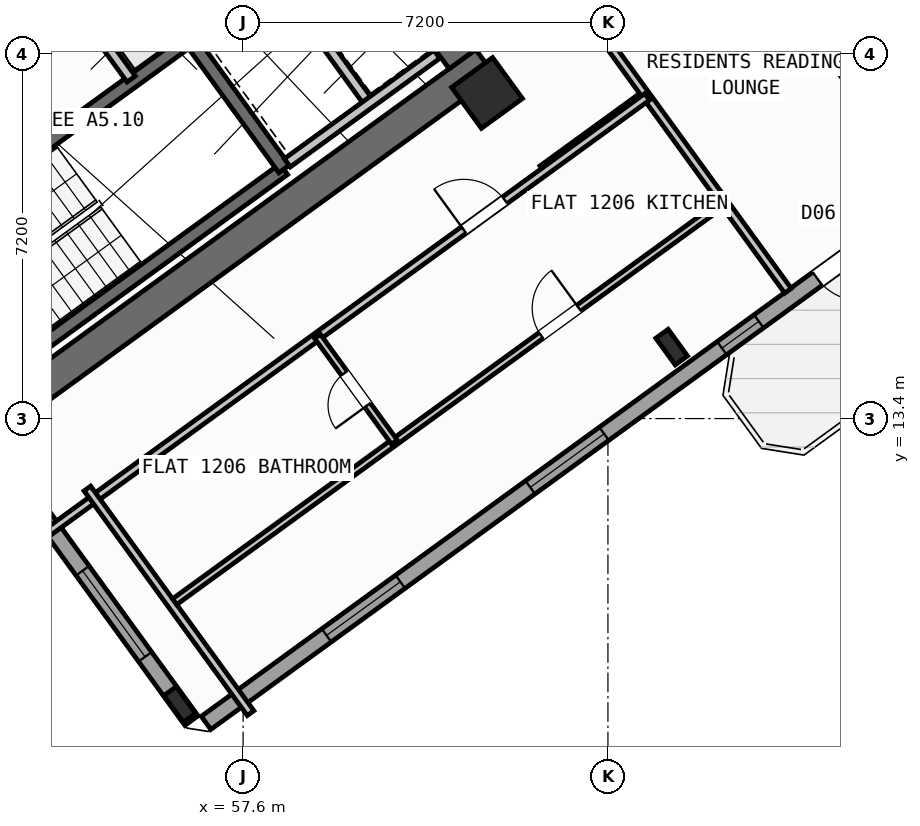
"""IFC4 building model, lengths in metres.
Left out: names, types, materials, properties, quantities, classifications, styles, units other than length and angle.
Written with IfcOpenShell. Run it as: python <this file> out.ifc"""

import sys

from ifc_helpers import new_model, si_unit, direction, frame, frame_2d, origin, origin_2d, place, context, subcontext, project, spatial, rectangle, hollow_rectangle, i_section, extrude, source, transform, mapped, element, fill, save


model = new_model("IFC4")
c1 = context("Model", 3, precision=1e-05, world=origin(), true_north=direction((0.0, 1.0)))
c2 = subcontext(c1, "Body", "Model", "MODEL_VIEW")
j1 = project(units=[si_unit("LENGTHUNIT", "METRE"), si_unit("PLANEANGLEUNIT", "RADIAN")], contexts=[c1])
p1 = place(None, origin())
s1 = spatial("IfcSite", under=j1, at=p1, CompositionType="ELEMENT")
p2 = place(p1, origin())
s2 = spatial("IfcBuilding", under=s1, at=p2, CompositionType="ELEMENT")
p3 = place(p2, frame((0.0, 0.0, 49.2)))
s3 = spatial("IfcBuildingStorey", under=s2, at=p3, CompositionType="ELEMENT", Elevation=49.2)
p4 = place(p3, frame((52.318, 13.11, 0.0), z_axis=(0.0, 0.0, 1.0), x_axis=(0.809019445368, 0.587781878776, 0.0)))
e1 = element("IfcWall", 1, at=p4, inside=s3, PredefinedType="SHEAR", context=c2, shape_type="SweptSolid", body=[
    extrude(rectangle(XDim=12.44, YDim=0.65, at=frame_2d((6.22, 0.0))), origin(), (0.0, 0.0, 1.0), 3.35),
])
p5 = place(p3, frame((61.929, 20.494, 0.0), z_axis=(0.0, 0.0, 1.0), x_axis=(-0.58782982593, 0.808984607855, 0.0)))
e2 = element("IfcWall", 2, at=p5, inside=s3, PredefinedType="SHEAR", context=c2, shape_type="SweptSolid", body=[
    extrude(rectangle(XDim=3.525, YDim=0.65, at=frame_2d((1.762, 0.0))), origin(), (0.0, 0.0, 1.0), 3.35),
])
m1 = source(origin(), c2, "Body", "SweptSolid", [
    extrude(i_section(OverallWidth=0.3, OverallDepth=0.65, WebThickness=0.016, FlangeThickness=0.031, at=origin_2d()), origin(), (0.0, 0.0, 1.0), 3.6),
])
for number, where, z_axis, x_axis in (
    (3, (56.35, 7.758, 0.0), (0.0, 0.0, 1.0), (0.809, 0.588, 0.0)),
    (4, (66.058, 14.811, 0.0), (0.0, 0.0, 1.0), (0.809, 0.588, 0.0)),
):
    element("IfcColumn", number, at=place(p3, frame(where, z_axis=z_axis, x_axis=x_axis)), inside=s3, PredefinedType="COLUMN", context=c2, shape_type="MappedRepresentation", body=[
        mapped(m1, transform((0.0, 0.0, 0.0), scale=1.0)),
    ])
m2 = source(origin(), c2, "Body", "SweptSolid", [
    extrude(hollow_rectangle(XDim=1.0, YDim=1.0, WallThickness=0.04, at=origin_2d()), origin(), (0.0, 0.0, 1.0), 3.6),
])
p6 = place(p3, frame((62.414, 19.827, 0.0), z_axis=(0.0, 0.0, 1.0), x_axis=(0.809016994375, 0.587785252292, 0.0)))
e5 = element("IfcColumn", 5, at=p6, inside=s3, PredefinedType="COLUMN", context=c2, shape_type="MappedRepresentation", body=[
    mapped(m2, transform((0.0, 0.0, 0.0), scale=1.0)),
])
p7 = place(p3, frame((58.455, 35.484, 0.0), z_axis=(0.0, 0.0, 1.0), x_axis=(0.587783625747, -0.809018176127, 0.0)))
e6 = element("IfcWall", 6, at=p7, inside=s3, PredefinedType="STANDARD", context=c2, shape_type="SweptSolid", body=[
    extrude(rectangle(XDim=21.587, YDim=0.32, at=frame_2d((10.794, 0.0))), origin(), (0.0, 0.0, 1.0), 2.725),
])
p8 = place(p7, frame((1.5, 0.0, 0.8)))
e7 = element("IfcOpeningElement", 7, at=p8, cuts=e6, PredefinedType="OPENING", context=c2, shape_type="SweptSolid", body=[
    extrude(rectangle(XDim=2.1, YDim=1.55, at=frame_2d((1.05, 0.775))), frame((0.0, 0.17, 0.0), z_axis=(0.0, -1.0, 0.0), x_axis=(1.0, 0.0, 0.0)), (0.0, 0.0, 1.0), 0.34),
])
p9 = place(p7, frame((5.105, 0.0, 0.85)))
e8 = element("IfcOpeningElement", 8, at=p9, cuts=e6, PredefinedType="OPENING", context=c2, shape_type="SweptSolid", body=[
    extrude(rectangle(XDim=1.5, YDim=1.5, at=frame_2d((0.75, 0.75))), frame((0.0, 0.17, 0.0), z_axis=(0.0, -1.0, 0.0), x_axis=(1.0, 0.0, 0.0)), (0.0, 0.0, 1.0), 0.34),
])
p10 = place(p7, frame((8.954, 0.0, 0.85)))
e9 = element("IfcOpeningElement", 9, at=p10, cuts=e6, PredefinedType="OPENING", context=c2, shape_type="SweptSolid", body=[
    extrude(rectangle(XDim=1.5, YDim=1.5, at=frame_2d((0.75, 0.75))), frame((0.0, 0.17, 0.0), z_axis=(0.0, -1.0, 0.0), x_axis=(1.0, 0.0, 0.0)), (0.0, 0.0, 1.0), 0.34),
])
p11 = place(p7, frame((17.581, 0.0, 0.95)))
e10 = element("IfcOpeningElement", 10, at=p11, cuts=e6, PredefinedType="OPENING", context=c2, shape_type="SweptSolid", body=[
    extrude(rectangle(XDim=1.2, YDim=1.4, at=frame_2d((0.6, 0.7))), frame((0.0, 0.17, 0.0), z_axis=(0.0, -1.0, 0.0), x_axis=(1.0, 0.0, 0.0)), (0.0, 0.0, 1.0), 0.34),
])
p12 = place(p3, frame((71.098, 17.731, 0.0), z_axis=(0.0, 0.0, 1.0), x_axis=(-0.809021120468, -0.587779573171, 0.0)))
e11 = element("IfcWall", 11, at=p12, inside=s3, PredefinedType="STANDARD", context=c2, shape_type="SweptSolid", body=[
    extrude(rectangle(XDim=17.588, YDim=0.32, at=frame_2d((8.794, 0.0))), origin(), (0.0, 0.0, 1.0), 3.35),
])
p13 = place(p12, frame((1.624, 0.0, 0.0)))
e12 = element("IfcOpeningElement", 12, at=p13, cuts=e11, PredefinedType="OPENING", context=c2, shape_type="SweptSolid", body=[
    extrude(rectangle(XDim=1.05, YDim=2.15, at=frame_2d((0.525, 1.075))), frame((0.0, 0.17, 0.0), z_axis=(0.0, -1.0, 0.0), x_axis=(1.0, 0.0, 0.0)), (0.0, 0.0, 1.0), 0.34),
])
p14 = place(p12, frame((4.104, 0.0, 1.0)))
e13 = element("IfcOpeningElement", 13, at=p14, cuts=e11, PredefinedType="OPENING", context=c2, shape_type="SweptSolid", body=[
    extrude(rectangle(XDim=0.9, YDim=1.25, at=frame_2d((0.45, 0.625))), frame((0.0, 0.17, 0.0), z_axis=(0.0, -1.0, 0.0), x_axis=(1.0, 0.0, 0.0)), (0.0, 0.0, 1.0), 0.34),
])
p15 = place(p12, frame((7.879, 0.0, 0.85)))
e14 = element("IfcOpeningElement", 14, at=p15, cuts=e11, PredefinedType="OPENING", context=c2, shape_type="SweptSolid", body=[
    extrude(rectangle(XDim=1.8, YDim=1.5, at=frame_2d((0.9, 0.75))), frame((0.0, 0.17, 0.0), z_axis=(0.0, -1.0, 0.0), x_axis=(1.0, 0.0, 0.0)), (0.0, 0.0, 1.0), 0.34),
])
p16 = place(p12, frame((12.849, 0.0, 0.85)))
e15 = element("IfcOpeningElement", 15, at=p16, cuts=e11, PredefinedType="OPENING", context=c2, shape_type="SweptSolid", body=[
    extrude(rectangle(XDim=1.8, YDim=1.5, at=frame_2d((0.9, 0.75))), frame((0.0, 0.17, 0.0), z_axis=(0.0, -1.0, 0.0), x_axis=(1.0, 0.0, 0.0)), (0.0, 0.0, 1.0), 0.34),
])
p17 = place(p3, frame((56.581, 7.439, 0.0), z_axis=(0.0, 0.0, 1.0), x_axis=(-0.587785875463, 0.809016541614, 0.0)))
e16 = element("IfcWall", 16, at=p17, inside=s3, PredefinedType="STANDARD", context=c2, shape_type="SweptSolid", body=[
    extrude(rectangle(XDim=6.774, YDim=0.32, at=frame_2d((3.387, 0.0))), origin(), (0.0, 0.0, 1.0), 2.725),
])
p18 = place(p17, frame((1.556, 0.0, 0.8)))
e17 = element("IfcOpeningElement", 17, at=p18, cuts=e16, PredefinedType="OPENING", context=c2, shape_type="SweptSolid", body=[
    extrude(rectangle(XDim=2.1, YDim=1.55, at=frame_2d((1.05, 0.775))), frame((0.0, 0.17, 0.0), z_axis=(0.0, -1.0, 0.0), x_axis=(1.0, 0.0, 0.0)), (0.0, 0.0, 1.0), 0.34),
])
p19 = place(p3, frame((52.472, 14.013, 0.0), z_axis=(0.0, 0.0, 1.0), x_axis=(0.809028366311, 0.587769599847, 0.0)))
e18 = element("IfcWall", 18, at=p19, inside=s3, PredefinedType="SHEAR", context=c2, shape_type="SweptSolid", body=[
    extrude(rectangle(XDim=7.33, YDim=0.26, at=frame_2d((3.665, 0.0))), origin(), (0.0, 0.0, 1.0), 3.35),
])
p20 = place(p3, frame((50.615, 16.57, 0.0), z_axis=(0.0, 0.0, 1.0), x_axis=(0.809028366311, 0.587769599847, 0.0)))
e19 = element("IfcWall", 19, at=p20, inside=s3, PredefinedType="SHEAR", context=c2, shape_type="SweptSolid", body=[
    extrude(rectangle(XDim=7.33, YDim=0.26, at=frame_2d((3.665, 0.0))), origin(), (0.0, 0.0, 1.0), 3.35),
])
p21 = place(p20, frame((0.22, 0.0, 0.0)))
e20 = element("IfcOpeningElement", 20, at=p21, cuts=e19, PredefinedType="OPENING", context=c2, shape_type="SweptSolid", body=[
    extrude(rectangle(XDim=1.1, YDim=2.1, at=frame_2d((0.55, 1.05))), frame((0.0, 0.14, 0.0), z_axis=(0.0, -1.0, 0.0), x_axis=(1.0, 0.0, 0.0)), (0.0, 0.0, 1.0), 0.28),
])
p22 = place(p3, frame((58.41, 18.327, 0.0), z_axis=(0.0, 0.0, 1.0), x_axis=(-0.58776738483, 0.809029975545, 0.0)))
e21 = element("IfcWall", 21, at=p22, inside=s3, PredefinedType="SHEAR", context=c2, shape_type="SweptSolid", body=[
    extrude(rectangle(XDim=3.16, YDim=0.26, at=frame_2d((1.58, 0.0))), origin(), (0.0, 0.0, 1.0), 3.35),
])
p23 = place(p3, frame((55.391, 20.102, 0.0), z_axis=(0.0, 0.0, 1.0), x_axis=(-0.58778447739, 0.809017557374, 0.0)))
e22 = element("IfcWall", 22, at=p23, inside=s3, PredefinedType="STANDARD", context=c2, shape_type="SweptSolid", body=[
    extrude(rectangle(XDim=1.65, YDim=0.2, at=frame_2d((0.825, 0.0))), origin(), (0.0, 0.0, 1.0), 3.34),
])
p24 = place(p3, frame((60.067, 19.655, 0.0), z_axis=(0.0, 0.0, 1.0), x_axis=(-0.587800520745, 0.809005900975, 0.0)))
e23 = element("IfcWall", 23, at=p24, inside=s3, PredefinedType="STANDARD", context=c2, shape_type="SweptSolid", body=[
    extrude(rectangle(XDim=2.66, YDim=0.2, at=frame_2d((1.33, 0.0))), origin(), (0.0, 0.0, 1.0), 3.34),
])
p25 = place(p3, frame((58.472, 18.447, 0.0), z_axis=(0.0, 0.0, 1.0), x_axis=(0.809022487728, 0.587777691266, 0.0)))
e24 = element("IfcWall", 24, at=p25, inside=s3, PredefinedType="STANDARD", context=c2, shape_type="SweptSolid", body=[
    extrude(rectangle(XDim=3.648, YDim=0.2, at=frame_2d((1.824, 0.0))), origin(), (0.0, 0.0, 1.0), 3.34),
])
p26 = place(p3, frame((63.507, 18.322, 0.0), z_axis=(0.0, 0.0, 1.0), x_axis=(0.809034604122, 0.587761013791, 0.0)))
e25 = element("IfcWall", 25, at=p26, inside=s3, PredefinedType="PARTITIONING", context=c2, shape_type="SweptSolid", body=[
    extrude(rectangle(XDim=2.51, YDim=0.16, at=frame_2d((1.255, 0.0))), origin(), (0.0, 0.0, 1.0), 3.34),
])
p27 = place(p3, frame((68.353, 15.922, 0.0), z_axis=(0.0, 0.0, 1.0), x_axis=(-0.58776839458, 0.809029241952, 0.0)))
e26 = element("IfcWall", 26, at=p27, inside=s3, PredefinedType="PARTITIONING", context=c2, shape_type="SweptSolid", body=[
    extrude(rectangle(XDim=8.1, YDim=0.16, at=frame_2d((4.05, 0.0))), origin(), (0.0, 0.0, 1.0), 3.34),
])
p28 = place(p3, frame((53.705, 11.126, 0.0), z_axis=(0.0, 0.0, 1.0), x_axis=(0.809014504436, 0.587788679384, 0.0)))
e27 = element("IfcWall", 27, at=p28, inside=s3, PredefinedType="PARTITIONING", context=c2, shape_type="SweptSolid", body=[
    extrude(rectangle(XDim=14.67, YDim=0.16, at=frame_2d((7.335, 0.0))), origin(), (0.0, 0.0, 1.0), 3.34),
])
p29 = place(p28, frame((10.2, 0.0, 0.0)))
e28 = element("IfcOpeningElement", 28, at=p29, cuts=e27, PredefinedType="OPENING", context=c2, shape_type="SweptSolid", body=[
    extrude(rectangle(XDim=1.0, YDim=2.1, at=frame_2d((0.5, 1.05))), frame((0.0, 0.09, 0.0), z_axis=(0.0, -1.0, 0.0), x_axis=(1.0, 0.0, 0.0)), (0.0, 0.0, 1.0), 0.18),
])
p30 = place(p3, frame((57.747, 7.586, 0.0), z_axis=(0.0, 0.0, 1.0), x_axis=(-0.587784893399, 0.809017255126, 0.0)))
e29 = element("IfcWall", 29, at=p30, inside=s3, PredefinedType="PARTITIONING", context=c2, shape_type="SweptSolid", body=[
    extrude(rectangle(XDim=5.48, YDim=0.16, at=frame_2d((2.74, 0.0))), origin(), (0.0, 0.0, 1.0), 3.34),
])
p31 = place(p3, frame((56.249, 9.785, 0.0), z_axis=(0.0, 0.0, 1.0), x_axis=(0.809011747655, 0.587792473715, 0.0)))
e30 = element("IfcWall", 30, at=p31, inside=s3, PredefinedType="PLUMBINGWALL", context=c2, shape_type="SweptSolid", body=[
    extrude(rectangle(XDim=13.4, YDim=0.14, at=frame_2d((6.7, 0.0))), origin(), (0.0, 0.0, 1.0), 3.34),
])
p32 = place(p31, frame((8.94, 0.0, 0.0)))
e31 = element("IfcOpeningElement", 31, at=p32, cuts=e30, PredefinedType="OPENING", context=c2, shape_type="SweptSolid", body=[
    extrude(rectangle(XDim=0.92, YDim=2.08, at=frame_2d((0.46, 1.04))), frame((0.0, 0.08, 0.0), z_axis=(0.0, -1.0, 0.0), x_axis=(1.0, 0.0, 0.0)), (0.0, 0.0, 1.0), 0.16),
])
p33 = place(p3, frame((60.585, 12.936, 0.0), z_axis=(0.0, 0.0, 1.0), x_axis=(-0.587772116736, 0.809026537752, 0.0)))
e32 = element("IfcWall", 32, at=p33, inside=s3, PredefinedType="PLUMBINGWALL", context=c2, shape_type="SweptSolid", body=[
    extrude(rectangle(XDim=2.58, YDim=0.14, at=frame_2d((1.29, 0.0))), origin(), (0.0, 0.0, 1.0), 3.34),
])
p34 = place(p33, frame((0.9, 0.0, 0.0)))
e33 = element("IfcOpeningElement", 33, at=p34, cuts=e32, PredefinedType="OPENING", context=c2, shape_type="SweptSolid", body=[
    extrude(rectangle(XDim=0.78, YDim=2.05, at=frame_2d((0.39, 1.025))), frame((0.0, 0.08, 0.0), z_axis=(0.0, -1.0, 0.0), x_axis=(1.0, 0.0, 0.0)), (0.0, 0.0, 1.0), 0.16),
])
m3 = source(origin(), c2, "Body", "SweptSolid", [
    extrude(rectangle(XDim=1.05, YDim=2.15, at=frame_2d((0.525, 1.075))), frame((0.0, 0.025, 0.0), z_axis=(0.0, -1.0, 0.0), x_axis=(1.0, 0.0, 0.0)), (0.0, 0.0, 1.0), 0.05),
])
p35 = place(p13, origin())
e34 = element("IfcDoor", 34, at=p35, inside=s3, OperationType="SINGLE_SWING_LEFT", PredefinedType="DOOR", context=c2, shape_type="MappedRepresentation", body=[
    mapped(m3, transform((0.0, 0.0, 0.0), scale=1.0)),
])
fill(e12, e34)
m4 = source(origin(), c2, "Body", "SweptSolid", [
    extrude(rectangle(XDim=1.2, YDim=1.4, at=frame_2d((0.6, 0.7))), frame((0.0, 0.03, 0.0), z_axis=(0.0, -1.0, 0.0), x_axis=(1.0, 0.0, 0.0)), (0.0, 0.0, 1.0), 0.06),
])
p36 = place(p11, origin())
e35 = element("IfcWindow", 35, at=p36, inside=s3, PartitioningType="SINGLE_PANEL", PredefinedType="WINDOW", context=c2, shape_type="MappedRepresentation", body=[
    mapped(m4, transform((0.0, 0.0, 0.0), scale=1.0)),
])
fill(e10, e35)
m5 = source(origin(), c2, "Body", "SweptSolid", [
    extrude(rectangle(XDim=0.9, YDim=1.25, at=frame_2d((0.45, 0.625))), frame((0.0, 0.03, 0.0), z_axis=(0.0, -1.0, 0.0), x_axis=(1.0, 0.0, 0.0)), (0.0, 0.0, 1.0), 0.06),
])
p37 = place(p14, origin())
e36 = element("IfcWindow", 36, at=p37, inside=s3, PartitioningType="SINGLE_PANEL", PredefinedType="WINDOW", context=c2, shape_type="MappedRepresentation", body=[
    mapped(m5, transform((0.0, 0.0, 0.0), scale=1.0)),
])
fill(e13, e36)
m6 = source(origin(), c2, "Body", "SweptSolid", [
    extrude(rectangle(XDim=1.8, YDim=1.5, at=frame_2d((0.9, 0.75))), frame((0.0, 0.03, 0.0), z_axis=(0.0, -1.0, 0.0), x_axis=(1.0, 0.0, 0.0)), (0.0, 0.0, 1.0), 0.06),
])
p38 = place(p15, origin())
e37 = element("IfcWindow", 37, at=p38, inside=s3, PartitioningType="SINGLE_PANEL", PredefinedType="WINDOW", context=c2, shape_type="MappedRepresentation", body=[
    mapped(m6, transform((0.0, 0.0, 0.0), scale=1.0)),
])
fill(e14, e37)
p39 = place(p16, origin())
e38 = element("IfcWindow", 38, at=p39, inside=s3, PartitioningType="SINGLE_PANEL", PredefinedType="WINDOW", context=c2, shape_type="MappedRepresentation", body=[
    mapped(m6, transform((0.0, 0.0, 0.0), scale=1.0)),
])
fill(e15, e38)
m7 = source(origin(), c2, "Body", "SweptSolid", [
    extrude(rectangle(XDim=2.1, YDim=1.55, at=frame_2d((1.05, 0.775))), frame((0.0, 0.03, 0.0), z_axis=(0.0, -1.0, 0.0), x_axis=(1.0, 0.0, 0.0)), (0.0, 0.0, 1.0), 0.06),
])
p40 = place(p18, origin())
e39 = element("IfcWindow", 39, at=p40, inside=s3, PartitioningType="SINGLE_PANEL", PredefinedType="WINDOW", context=c2, shape_type="MappedRepresentation", body=[
    mapped(m7, transform((0.0, 0.0, 0.0), scale=1.0)),
])
fill(e17, e39)
m8 = source(origin(), c2, "Body", "SweptSolid", [
    extrude(rectangle(XDim=1.0, YDim=2.1, at=frame_2d((0.5, 1.05))), frame((0.0, 0.025, 0.0), z_axis=(0.0, -1.0, 0.0), x_axis=(1.0, 0.0, 0.0)), (0.0, 0.0, 1.0), 0.05),
])
p41 = place(p29, origin())
e40 = element("IfcDoor", 40, at=p41, inside=s3, OperationType="SINGLE_SWING_LEFT", PredefinedType="DOOR", context=c2, shape_type="MappedRepresentation", body=[
    mapped(m8, transform((0.0, 0.0, 0.0), scale=1.0)),
])
fill(e28, e40)
m9 = source(origin(), c2, "Body", "SweptSolid", [
    extrude(rectangle(XDim=0.92, YDim=2.08, at=frame_2d((0.46, 1.04))), frame((0.0, 0.025, 0.0), z_axis=(0.0, -1.0, 0.0), x_axis=(1.0, 0.0, 0.0)), (0.0, 0.0, 1.0), 0.05),
])
p42 = place(p32, origin())
e41 = element("IfcDoor", 41, at=p42, inside=s3, OperationType="SINGLE_SWING_RIGHT", PredefinedType="DOOR", context=c2, shape_type="MappedRepresentation", body=[
    mapped(m9, transform((0.0, 0.0, 0.0), scale=1.0)),
])
fill(e31, e41)
m10 = source(origin(), c2, "Body", "SweptSolid", [
    extrude(rectangle(XDim=0.78, YDim=2.05, at=frame_2d((0.39, 1.025))), frame((0.0, 0.025, 0.0), z_axis=(0.0, -1.0, 0.0), x_axis=(1.0, 0.0, 0.0)), (0.0, 0.0, 1.0), 0.05),
])
p43 = place(p34, origin())
e42 = element("IfcDoor", 42, at=p43, inside=s3, OperationType="SINGLE_SWING_LEFT", PredefinedType="DOOR", context=c2, shape_type="MappedRepresentation", body=[
    mapped(m10, transform((0.0, 0.0, 0.0), scale=1.0)),
])
fill(e33, e42)
save(model, sys.argv[1])
